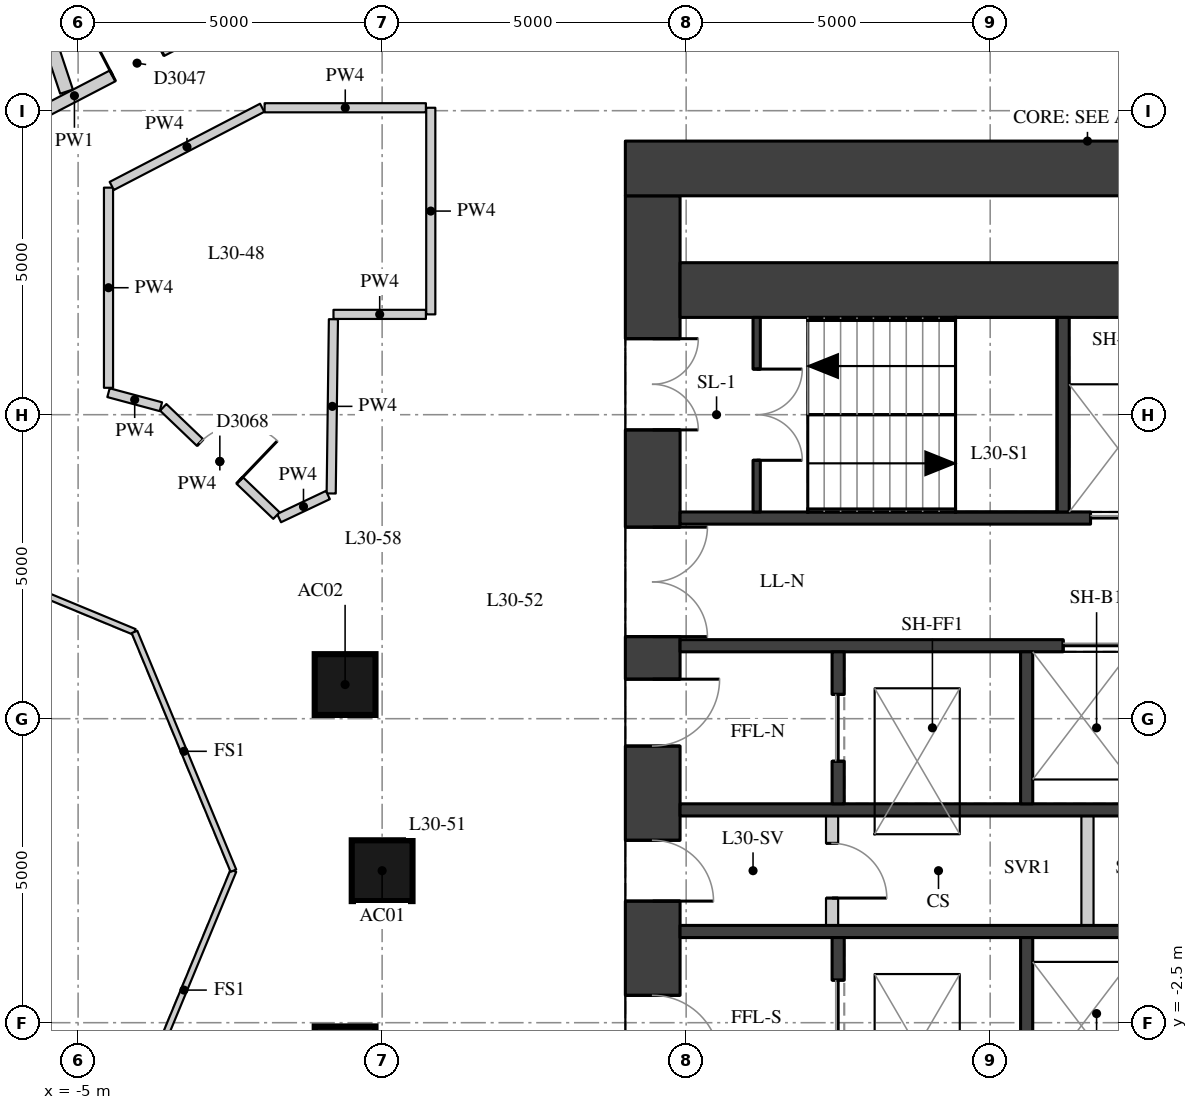
"""IFC4 building model, lengths in metres.
Left out: names, types, materials, properties, quantities, classifications, styles, units other than length and angle.
Written with IfcOpenShell. Run it as: python <this file> out.ifc"""

import sys

from ifc_helpers import new_model, si_unit, direction, frame, frame_2d, origin, origin_2d, place, context, subcontext, project, spatial, rectangle, extrude, element, fill, save


model = new_model("IFC4")
c1 = context("Model", 3, precision=1e-05, world=origin(), true_north=direction((0.0, 1.0)))
c2 = subcontext(c1, "Body", "Model", "MODEL_VIEW")
j1 = project(units=[si_unit("LENGTHUNIT", "METRE"), si_unit("PLANEANGLEUNIT", "RADIAN")], contexts=[c1])
p1 = place(None, origin())
s1 = spatial("IfcSite", under=j1, at=p1, CompositionType="ELEMENT")
p2 = place(p1, origin())
s2 = spatial("IfcBuilding", under=s1, at=p2, CompositionType="ELEMENT")
p3 = place(p2, frame((0.0, 0.0, 108.7)))
s3 = spatial("IfcBuildingStorey", under=s2, at=p3, CompositionType="ELEMENT", Elevation=108.7)
for number, where, z_axis, x_axis in (
    (1, (0.0, 0.0, 0.0), (0.0, 0.0, 1.0), (1.0, 0.0, 0.0)),
    (2, (-0.609, 3.062, 0.0), (0.0, 0.0, 1.0), (1.0, 0.0, 0.0)),
    (3, (-0.609, -3.062, 0.0), (0.0, 0.0, 1.0), (1.0, 0.0, 0.0)),
):
    element("IfcColumn", number, at=place(p3, frame(where, z_axis=z_axis, x_axis=x_axis)), inside=s3, PredefinedType="COLUMN", context=c2, shape_type="SweptSolid", body=[
        extrude(rectangle(XDim=1.0, YDim=1.0, at=origin_2d()), origin(), (0.0, 0.0, 1.0), 3.3),
    ])
p4 = place(p3, frame((4.45, -11.1, 0.0), z_axis=(0.0, 0.0, 1.0), x_axis=(0.0, 1.0, 0.0)))
e4 = element("IfcWall", 4, at=p4, inside=s3, PredefinedType="SHEAR", context=c2, shape_type="SweptSolid", body=[
    extrude(rectangle(XDim=22.2, YDim=0.9, at=frame_2d((11.1, 0.0))), origin(), (0.0, 0.0, 1.0), 3.02),
])
p5 = place(p4, frame((2.35, 0.0, 0.0)))
e5 = element("IfcOpeningElement", 5, at=p5, cuts=e4, PredefinedType="OPENING", context=c2, shape_type="SweptSolid", body=[
    extrude(rectangle(XDim=1.5, YDim=2.1, at=frame_2d((0.75, 1.05))), frame((0.0, 0.46, 0.0), z_axis=(0.0, -1.0, 0.0), x_axis=(1.0, 0.0, 0.0)), (0.0, 0.0, 1.0), 0.92),
])
p6 = place(p4, frame((5.45, 0.0, 0.0)))
e6 = element("IfcOpeningElement", 6, at=p6, cuts=e4, PredefinedType="OPENING", context=c2, shape_type="SweptSolid", body=[
    extrude(rectangle(XDim=1.8, YDim=2.1, at=frame_2d((0.9, 1.05))), frame((0.0, 0.46, 0.0), z_axis=(0.0, -1.0, 0.0), x_axis=(1.0, 0.0, 0.0)), (0.0, 0.0, 1.0), 0.92),
])
p7 = place(p4, frame((7.95, 0.0, 0.0)))
e7 = element("IfcOpeningElement", 7, at=p7, cuts=e4, PredefinedType="OPENING", context=c2, shape_type="SweptSolid", body=[
    extrude(rectangle(XDim=1.1, YDim=2.1, at=frame_2d((0.55, 1.05))), frame((0.0, 0.46, 0.0), z_axis=(0.0, -1.0, 0.0), x_axis=(1.0, 0.0, 0.0)), (0.0, 0.0, 1.0), 0.92),
])
p8 = place(p4, frame((10.6, 0.0, 0.0)))
e8 = element("IfcOpeningElement", 8, at=p8, cuts=e4, PredefinedType="OPENING", context=c2, shape_type="SweptSolid", body=[
    extrude(rectangle(XDim=1.0, YDim=2.1, at=frame_2d((0.5, 1.05))), frame((0.0, 0.46, 0.0), z_axis=(0.0, -1.0, 0.0), x_axis=(1.0, 0.0, 0.0)), (0.0, 0.0, 1.0), 0.92),
])
p9 = place(p4, frame((13.15, 0.0, 0.0)))
e9 = element("IfcOpeningElement", 9, at=p9, cuts=e4, PredefinedType="OPENING", context=c2, shape_type="SweptSolid", body=[
    extrude(rectangle(XDim=1.1, YDim=2.1, at=frame_2d((0.55, 1.05))), frame((0.0, 0.46, 0.0), z_axis=(0.0, -1.0, 0.0), x_axis=(1.0, 0.0, 0.0)), (0.0, 0.0, 1.0), 0.92),
])
p10 = place(p4, frame((14.95, 0.0, 0.0)))
e10 = element("IfcOpeningElement", 10, at=p10, cuts=e4, PredefinedType="OPENING", context=c2, shape_type="SweptSolid", body=[
    extrude(rectangle(XDim=1.8, YDim=2.1, at=frame_2d((0.9, 1.05))), frame((0.0, 0.46, 0.0), z_axis=(0.0, -1.0, 0.0), x_axis=(1.0, 0.0, 0.0)), (0.0, 0.0, 1.0), 0.92),
])
p11 = place(p4, frame((18.35, 0.0, 0.0)))
e11 = element("IfcOpeningElement", 11, at=p11, cuts=e4, PredefinedType="OPENING", context=c2, shape_type="SweptSolid", body=[
    extrude(rectangle(XDim=1.5, YDim=2.1, at=frame_2d((0.75, 1.05))), frame((0.0, 0.46, 0.0), z_axis=(0.0, -1.0, 0.0), x_axis=(1.0, 0.0, 0.0)), (0.0, 0.0, 1.0), 0.92),
])
p12 = place(p3, frame((4.0, 11.55, 0.0), z_axis=(0.0, 0.0, 1.0), x_axis=(1.0, 0.0, 0.0)))
e12 = element("IfcWall", 12, at=p12, inside=s3, PredefinedType="SHEAR", context=c2, shape_type="SweptSolid", body=[
    extrude(rectangle(XDim=15.2, YDim=0.9, at=frame_2d((7.6, 0.0))), origin(), (0.0, 0.0, 1.0), 3.02),
])
p13 = place(p3, frame((4.9, 9.55, 0.0), z_axis=(0.0, 0.0, 1.0), x_axis=(1.0, 0.0, 0.0)))
e13 = element("IfcWall", 13, at=p13, inside=s3, PredefinedType="SHEAR", context=c2, shape_type="SweptSolid", body=[
    extrude(rectangle(XDim=10.2, YDim=0.9, at=frame_2d((5.1, 0.0))), origin(), (0.0, 0.0, 1.0), 3.02),
])
p14 = place(p3, frame((4.9, 5.8, 0.0), z_axis=(0.0, 0.0, 1.0), x_axis=(1.0, 0.0, 0.0)))
e14 = element("IfcWall", 14, at=p14, inside=s3, PredefinedType="SHEAR", context=c2, shape_type="SweptSolid", body=[
    extrude(rectangle(XDim=10.2, YDim=0.2, at=frame_2d((5.1, 0.0))), origin(), (0.0, 0.0, 1.0), 3.02),
])
p15 = place(p14, frame((6.75, 0.0, 0.0)))
e15 = element("IfcOpeningElement", 15, at=p15, cuts=e14, PredefinedType="OPENING", context=c2, shape_type="SweptSolid", body=[
    extrude(rectangle(XDim=1.1, YDim=2.1, at=frame_2d((0.55, 1.05))), frame((0.0, 0.11, 0.0), z_axis=(0.0, -1.0, 0.0), x_axis=(1.0, 0.0, 0.0)), (0.0, 0.0, 1.0), 0.22),
])
p16 = place(p14, frame((8.75, 0.0, 0.0)))
e16 = element("IfcOpeningElement", 16, at=p16, cuts=e14, PredefinedType="OPENING", context=c2, shape_type="SweptSolid", body=[
    extrude(rectangle(XDim=1.1, YDim=2.1, at=frame_2d((0.55, 1.05))), frame((0.0, 0.11, 0.0), z_axis=(0.0, -1.0, 0.0), x_axis=(1.0, 0.0, 0.0)), (0.0, 0.0, 1.0), 0.22),
])
p17 = place(p3, frame((4.9, 3.7, 0.0), z_axis=(0.0, 0.0, 1.0), x_axis=(1.0, 0.0, 0.0)))
e17 = element("IfcWall", 17, at=p17, inside=s3, PredefinedType="SHEAR", context=c2, shape_type="SweptSolid", body=[
    extrude(rectangle(XDim=10.2, YDim=0.2, at=frame_2d((5.1, 0.0))), origin(), (0.0, 0.0, 1.0), 3.02),
])
p18 = place(p17, frame((6.3, 0.0, 0.0)))
e18 = element("IfcOpeningElement", 18, at=p18, cuts=e17, PredefinedType="OPENING", context=c2, shape_type="SweptSolid", body=[
    extrude(rectangle(XDim=1.1, YDim=2.1, at=frame_2d((0.55, 1.05))), frame((0.0, 0.11, 0.0), z_axis=(0.0, -1.0, 0.0), x_axis=(1.0, 0.0, 0.0)), (0.0, 0.0, 1.0), 0.22),
])
p19 = place(p17, frame((8.6, 0.0, 0.0)))
e19 = element("IfcOpeningElement", 19, at=p19, cuts=e17, PredefinedType="OPENING", context=c2, shape_type="SweptSolid", body=[
    extrude(rectangle(XDim=1.1, YDim=2.1, at=frame_2d((0.55, 1.05))), frame((0.0, 0.11, 0.0), z_axis=(0.0, -1.0, 0.0), x_axis=(1.0, 0.0, 0.0)), (0.0, 0.0, 1.0), 0.22),
])
for number, where, z_axis, x_axis in (
    (20, (4.9, 1.0, 0.0), (0.0, 0.0, 1.0), (1.0, 0.0, 0.0)),
    (21, (4.9, -1.0, 0.0), (0.0, 0.0, 1.0), (1.0, 0.0, 0.0)),
):
    element("IfcWall", number, at=place(p3, frame(where, z_axis=z_axis, x_axis=x_axis)), inside=s3, PredefinedType="SHEAR", context=c2, shape_type="SweptSolid", body=[
        extrude(rectangle(XDim=10.2, YDim=0.2, at=frame_2d((5.1, 0.0))), origin(), (0.0, 0.0, 1.0), 3.02),
    ])
p20 = place(p3, frame((11.2, 5.9, 0.0), z_axis=(0.0, 0.0, 1.0), x_axis=(0.0, 1.0, 0.0)))
e22 = element("IfcWall", 22, at=p20, inside=s3, PredefinedType="SHEAR", context=c2, shape_type="SweptSolid", body=[
    extrude(rectangle(XDim=3.2, YDim=0.2, at=frame_2d((1.6, 0.0))), origin(), (0.0, 0.0, 1.0), 3.02),
])
p21 = place(p3, frame((7.5, 1.1, 0.0), z_axis=(0.0, 0.0, 1.0), x_axis=(0.0, 1.0, 0.0)))
e23 = element("IfcWall", 23, at=p21, inside=s3, PredefinedType="SHEAR", context=c2, shape_type="SweptSolid", body=[
    extrude(rectangle(XDim=2.5, YDim=0.2, at=frame_2d((1.25, 0.0))), origin(), (0.0, 0.0, 1.0), 3.02),
])
p22 = place(p21, frame((0.7, 0.0, 0.0)))
e24 = element("IfcOpeningElement", 24, at=p22, cuts=e23, PredefinedType="OPENING", context=c2, shape_type="SweptSolid", body=[
    extrude(rectangle(XDim=1.1, YDim=2.1, at=frame_2d((0.55, 1.05))), frame((0.0, 0.11, 0.0), z_axis=(0.0, -1.0, 0.0), x_axis=(1.0, 0.0, 0.0)), (0.0, 0.0, 1.0), 0.22),
])
p23 = place(p3, frame((7.5, -3.6, 0.0), z_axis=(0.0, 0.0, 1.0), x_axis=(0.0, 1.0, 0.0)))
e25 = element("IfcWall", 25, at=p23, inside=s3, PredefinedType="SHEAR", context=c2, shape_type="SweptSolid", body=[
    extrude(rectangle(XDim=2.5, YDim=0.2, at=frame_2d((1.25, 0.0))), origin(), (0.0, 0.0, 1.0), 3.02),
])
p24 = place(p23, frame((0.7, 0.0, 0.0)))
e26 = element("IfcOpeningElement", 26, at=p24, cuts=e25, PredefinedType="OPENING", context=c2, shape_type="SweptSolid", body=[
    extrude(rectangle(XDim=1.1, YDim=2.1, at=frame_2d((0.55, 1.05))), frame((0.0, 0.11, 0.0), z_axis=(0.0, -1.0, 0.0), x_axis=(1.0, 0.0, 0.0)), (0.0, 0.0, 1.0), 0.22),
])
for number, where, z_axis, x_axis in (
    (27, (10.6, 1.1, 0.0), (0.0, 0.0, 1.0), (0.0, 1.0, 0.0)),
    (28, (10.6, -3.6, 0.0), (0.0, 0.0, 1.0), (0.0, 1.0, 0.0)),
):
    element("IfcWall", number, at=place(p3, frame(where, z_axis=z_axis, x_axis=x_axis)), inside=s3, PredefinedType="SHEAR", context=c2, shape_type="SweptSolid", body=[
        extrude(rectangle(XDim=2.5, YDim=0.2, at=frame_2d((1.25, 0.0))), origin(), (0.0, 0.0, 1.0), 3.02),
    ])
p25 = place(p3, frame((6.16, 5.9, 0.0), z_axis=(0.0, 0.0, 1.0), x_axis=(0.0, 1.0, 0.0)))
e29 = element("IfcWall", 29, at=p25, inside=s3, PredefinedType="SHEAR", context=c2, shape_type="SweptSolid", body=[
    extrude(rectangle(XDim=3.2, YDim=0.12, at=frame_2d((1.6, 0.0))), origin(), (0.0, 0.0, 1.0), 3.02),
])
p26 = place(p25, frame((0.85, 0.0, 0.0)))
e30 = element("IfcOpeningElement", 30, at=p26, cuts=e29, PredefinedType="OPENING", context=c2, shape_type="SweptSolid", body=[
    extrude(rectangle(XDim=1.5, YDim=2.1, at=frame_2d((0.75, 1.05))), frame((0.0, 0.07, 0.0), z_axis=(0.0, -1.0, 0.0), x_axis=(1.0, 0.0, 0.0)), (0.0, 0.0, 1.0), 0.14),
])
p27 = place(p3, frame((7.4, -0.9, 0.0), z_axis=(0.0, 0.0, 1.0), x_axis=(0.0, 1.0, 0.0)))
e31 = element("IfcWall", 31, at=p27, inside=s3, PredefinedType="PARTITIONING", context=c2, shape_type="SweptSolid", body=[
    extrude(rectangle(XDim=1.8, YDim=0.2, at=frame_2d((0.9, 0.0))), origin(), (0.0, 0.0, 1.0), 3.02),
])
p28 = place(p27, frame((0.45, 0.0, 0.0)))
e32 = element("IfcOpeningElement", 32, at=p28, cuts=e31, PredefinedType="OPENING", context=c2, shape_type="SweptSolid", body=[
    extrude(rectangle(XDim=0.9, YDim=2.1, at=frame_2d((0.45, 1.05))), frame((0.0, 0.11, 0.0), z_axis=(0.0, -1.0, 0.0), x_axis=(1.0, 0.0, 0.0)), (0.0, 0.0, 1.0), 0.22),
])
p29 = place(p3, frame((11.6, -0.9, 0.0), z_axis=(0.0, 0.0, 1.0), x_axis=(0.0, 1.0, 0.0)))
e33 = element("IfcWall", 33, at=p29, inside=s3, PredefinedType="PARTITIONING", context=c2, shape_type="SweptSolid", body=[
    extrude(rectangle(XDim=1.8, YDim=0.2, at=frame_2d((0.9, 0.0))), origin(), (0.0, 0.0, 1.0), 3.02),
])
p30 = place(p3, frame((-7.757, 11.344, 0.0), z_axis=(0.0, 0.0, 1.0), x_axis=(0.887263483993, 0.461262951008, 0.0)))
e34 = element("IfcWall", 34, at=p30, inside=s3, PredefinedType="PARTITIONING", context=c2, shape_type="SweptSolid", body=[
    extrude(rectangle(XDim=6.079, YDim=0.2, at=frame_2d((3.04, 0.0))), origin(), (0.0, 0.0, 1.0), 3.02),
])
p31 = place(p30, frame((3.75, 0.0, 0.0)))
e35 = element("IfcOpeningElement", 35, at=p31, cuts=e34, PredefinedType="OPENING", context=c2, shape_type="SweptSolid", body=[
    extrude(rectangle(XDim=0.9, YDim=2.1, at=frame_2d((0.45, 1.05))), frame((0.0, 0.11, 0.0), z_axis=(0.0, -1.0, 0.0), x_axis=(1.0, 0.0, 0.0)), (0.0, 0.0, 1.0), 0.22),
])
p32 = place(p3, frame((0.8, 12.548, 0.0), z_axis=(0.0, 0.0, 1.0), x_axis=(0.0, -1.0, 0.0)))
e36 = element("IfcWall", 36, at=p32, inside=s3, PredefinedType="PARTITIONING", context=c2, shape_type="SweptSolid", body=[
    extrude(rectangle(XDim=3.398, YDim=0.15, at=frame_2d((1.699, 0.0))), origin(), (0.0, 0.0, 1.0), 3.02),
])
p33 = place(p3, frame((0.72, 9.15, 0.0), z_axis=(0.0, 0.0, 1.0), x_axis=(-1.0, 0.0, 0.0)))
e37 = element("IfcWall", 37, at=p33, inside=s3, PredefinedType="PARTITIONING", context=c2, shape_type="SweptSolid", body=[
    extrude(rectangle(XDim=1.52, YDim=0.15, at=frame_2d((0.76, 0.0))), origin(), (0.0, 0.0, 1.0), 3.02),
])
p34 = place(p3, frame((-0.801, 9.07, 0.0), z_axis=(0.0, 0.0, 1.0), x_axis=(-0.012779053564, -0.999918344561, 0.0)))
e38 = element("IfcWall", 38, at=p34, inside=s3, PredefinedType="PARTITIONING", context=c2, shape_type="SweptSolid", body=[
    extrude(rectangle(XDim=2.866, YDim=0.15, at=frame_2d((1.433, 0.0))), origin(), (0.0, 0.0, 1.0), 3.02),
])
p35 = place(p3, frame((-0.892, 6.179, 0.0), z_axis=(0.0, 0.0, 1.0), x_axis=(-0.903944794982, -0.427649164181, 0.0)))
e39 = element("IfcWall", 39, at=p35, inside=s3, PredefinedType="PARTITIONING", context=c2, shape_type="SweptSolid", body=[
    extrude(rectangle(XDim=0.888, YDim=0.15, at=frame_2d((0.444, 0.0))), origin(), (0.0, 0.0, 1.0), 3.02),
])
p36 = place(p3, frame((-1.738, 5.841, 0.0), z_axis=(0.0, 0.0, 1.0), x_axis=(-0.722802374111, 0.691054793761, 0.0)))
e40 = element("IfcWall", 40, at=p36, inside=s3, PredefinedType="PARTITIONING", context=c2, shape_type="SweptSolid", body=[
    extrude(rectangle(XDim=2.576, YDim=0.15, at=frame_2d((1.288, 0.0))), origin(), (0.0, 0.0, 1.0), 3.02),
])
p37 = place(p36, frame((0.838, 0.0, 0.0)))
e41 = element("IfcOpeningElement", 41, at=p37, cuts=e40, PredefinedType="OPENING", context=c2, shape_type="SweptSolid", body=[
    extrude(rectangle(XDim=0.9, YDim=2.1, at=frame_2d((0.45, 1.05))), frame((0.0, 0.085, 0.0), z_axis=(0.0, -1.0, 0.0), x_axis=(1.0, 0.0, 0.0)), (0.0, 0.0, 1.0), 0.17),
])
p38 = place(p3, frame((-3.639, 7.631, 0.0), z_axis=(0.0, 0.0, 1.0), x_axis=(-0.965879594242, 0.258991523853, 0.0)))
e42 = element("IfcWall", 42, at=p38, inside=s3, PredefinedType="PARTITIONING", context=c2, shape_type="SweptSolid", body=[
    extrude(rectangle(XDim=0.892, YDim=0.15, at=frame_2d((0.446, 0.0))), origin(), (0.0, 0.0, 1.0), 3.02),
])
p39 = place(p3, frame((-4.5, 7.942, 0.0), z_axis=(0.0, 0.0, 1.0), x_axis=(0.0, 1.0, 0.0)))
e43 = element("IfcWall", 43, at=p39, inside=s3, PredefinedType="PARTITIONING", context=c2, shape_type="SweptSolid", body=[
    extrude(rectangle(XDim=3.292, YDim=0.15, at=frame_2d((1.646, 0.0))), origin(), (0.0, 0.0, 1.0), 3.02),
])
p40 = place(p3, frame((-4.447, 11.262, 0.0), z_axis=(0.0, 0.0, 1.0), x_axis=(0.887294207503, 0.461203847915, 0.0)))
e44 = element("IfcWall", 44, at=p40, inside=s3, PredefinedType="PARTITIONING", context=c2, shape_type="SweptSolid", body=[
    extrude(rectangle(XDim=2.788, YDim=0.15, at=frame_2d((1.394, 0.0))), origin(), (0.0, 0.0, 1.0), 3.02),
])
p41 = place(p3, frame((-1.933, 12.548, 0.0), z_axis=(0.0, 0.0, 1.0), x_axis=(1.0, 0.0, 0.0)))
e45 = element("IfcWall", 45, at=p41, inside=s3, PredefinedType="PARTITIONING", context=c2, shape_type="SweptSolid", body=[
    extrude(rectangle(XDim=2.653, YDim=0.15, at=frame_2d((1.326, 0.0))), origin(), (0.0, 0.0, 1.0), 3.02),
])
p42 = place(p3, frame((-7.874, 20.912, 0.0), z_axis=(0.0, 0.0, 1.0), x_axis=(0.314561749761, -0.949237012335, 0.0)))
e46 = element("IfcWall", 46, at=p42, inside=s3, PredefinedType="PARTITIONING", context=c2, shape_type="SweptSolid", body=[
    extrude(rectangle(XDim=8.531, YDim=0.22, at=frame_2d((4.266, 0.0))), origin(), (0.0, 0.0, 1.0), 3.02),
])
for number, where, z_axis, x_axis in (
    (47, (-2.446, 0.0, 0.0), (0.0, 0.0, 1.0), (-0.383, -0.924, 0.0)),
    (48, (-8.0, 5.554, 0.0), (0.0, 0.0, 1.0), (0.924, -0.383, 0.0)),
    (49, (-4.073, 3.927, 0.0), (0.0, 0.0, 1.0), (0.383, -0.924, 0.0)),
):
    element("IfcWall", number, at=place(p3, frame(where, z_axis=z_axis, x_axis=x_axis)), inside=s3, PredefinedType="PARTITIONING", context=c2, shape_type="SweptSolid", body=[
        extrude(rectangle(XDim=4.251, YDim=0.1, at=frame_2d((2.125, 0.0))), origin(), (0.0, 0.0, 1.0), 3.02),
    ])
p43 = place(p7, origin())
e50 = element("IfcDoor", 50, at=p43, inside=s3, OperationType="SINGLE_SWING_RIGHT", PredefinedType="DOOR", context=c2, shape_type="SweptSolid", body=[
    extrude(rectangle(XDim=1.1, YDim=2.1, at=frame_2d((0.55, 1.05))), frame((0.0, 0.025, 0.0), z_axis=(0.0, -1.0, 0.0), x_axis=(1.0, 0.0, 0.0)), (0.0, 0.0, 1.0), 0.05),
])
fill(e7, e50)
p44 = place(p8, origin())
e51 = element("IfcDoor", 51, at=p44, inside=s3, OperationType="SINGLE_SWING_RIGHT", PredefinedType="DOOR", context=c2, shape_type="SweptSolid", body=[
    extrude(rectangle(XDim=1.0, YDim=2.1, at=frame_2d((0.5, 1.05))), frame((0.0, 0.025, 0.0), z_axis=(0.0, -1.0, 0.0), x_axis=(1.0, 0.0, 0.0)), (0.0, 0.0, 1.0), 0.05),
])
fill(e8, e51)
p45 = place(p9, origin())
e52 = element("IfcDoor", 52, at=p45, inside=s3, OperationType="SINGLE_SWING_LEFT", PredefinedType="DOOR", context=c2, shape_type="SweptSolid", body=[
    extrude(rectangle(XDim=1.1, YDim=2.1, at=frame_2d((0.55, 1.05))), frame((0.0, 0.025, 0.0), z_axis=(0.0, -1.0, 0.0), x_axis=(1.0, 0.0, 0.0)), (0.0, 0.0, 1.0), 0.05),
])
fill(e9, e52)
p46 = place(p10, origin())
e53 = element("IfcDoor", 53, at=p46, inside=s3, OperationType="DOUBLE_DOOR_SINGLE_SWING", PredefinedType="DOOR", context=c2, shape_type="SweptSolid", body=[
    extrude(rectangle(XDim=1.8, YDim=2.1, at=frame_2d((0.9, 1.05))), frame((0.0, 0.025, 0.0), z_axis=(0.0, -1.0, 0.0), x_axis=(1.0, 0.0, 0.0)), (0.0, 0.0, 1.0), 0.05),
])
fill(e10, e53)
p47 = place(p11, origin())
e54 = element("IfcDoor", 54, at=p47, inside=s3, OperationType="DOUBLE_DOOR_SINGLE_SWING", PredefinedType="DOOR", context=c2, shape_type="SweptSolid", body=[
    extrude(rectangle(XDim=1.5, YDim=2.1, at=frame_2d((0.75, 1.05))), frame((0.0, 0.025, 0.0), z_axis=(0.0, -1.0, 0.0), x_axis=(1.0, 0.0, 0.0)), (0.0, 0.0, 1.0), 0.05),
])
fill(e11, e54)
p48 = place(p26, origin())
e55 = element("IfcDoor", 55, at=p48, inside=s3, OperationType="DOUBLE_DOOR_SINGLE_SWING", PredefinedType="DOOR", context=c2, shape_type="SweptSolid", body=[
    extrude(rectangle(XDim=1.5, YDim=2.1, at=frame_2d((0.75, 1.05))), frame((0.0, 0.025, 0.0), z_axis=(0.0, -1.0, 0.0), x_axis=(1.0, 0.0, 0.0)), (0.0, 0.0, 1.0), 0.05),
])
fill(e30, e55)
p49 = place(p15, origin())
e56 = element("IfcDoor", 56, at=p49, inside=s3, OperationType="DOUBLE_DOOR_SLIDING", PredefinedType="DOOR", context=c2, shape_type="SweptSolid", body=[
    extrude(rectangle(XDim=1.1, YDim=2.1, at=frame_2d((0.55, 1.05))), frame((0.0, 0.025, 0.0), z_axis=(0.0, -1.0, 0.0), x_axis=(1.0, 0.0, 0.0)), (0.0, 0.0, 1.0), 0.05),
])
fill(e15, e56)
p50 = place(p18, origin())
e57 = element("IfcDoor", 57, at=p50, inside=s3, OperationType="DOUBLE_DOOR_SLIDING", PredefinedType="DOOR", context=c2, shape_type="SweptSolid", body=[
    extrude(rectangle(XDim=1.1, YDim=2.1, at=frame_2d((0.55, 1.05))), frame((0.0, 0.025, 0.0), z_axis=(0.0, -1.0, 0.0), x_axis=(1.0, 0.0, 0.0)), (0.0, 0.0, 1.0), 0.05),
])
fill(e18, e57)
p51 = place(p22, origin())
e58 = element("IfcDoor", 58, at=p51, inside=s3, OperationType="DOUBLE_DOOR_SLIDING", PredefinedType="DOOR", context=c2, shape_type="SweptSolid", body=[
    extrude(rectangle(XDim=1.1, YDim=2.1, at=frame_2d((0.55, 1.05))), frame((0.0, 0.025, 0.0), z_axis=(0.0, -1.0, 0.0), x_axis=(1.0, 0.0, 0.0)), (0.0, 0.0, 1.0), 0.05),
])
fill(e24, e58)
p52 = place(p24, origin())
e59 = element("IfcDoor", 59, at=p52, inside=s3, OperationType="DOUBLE_DOOR_SLIDING", PredefinedType="DOOR", context=c2, shape_type="SweptSolid", body=[
    extrude(rectangle(XDim=1.1, YDim=2.1, at=frame_2d((0.55, 1.05))), frame((0.0, 0.025, 0.0), z_axis=(0.0, -1.0, 0.0), x_axis=(1.0, 0.0, 0.0)), (0.0, 0.0, 1.0), 0.05),
])
fill(e26, e59)
p53 = place(p28, origin())
e60 = element("IfcDoor", 60, at=p53, inside=s3, OperationType="SINGLE_SWING_RIGHT", PredefinedType="DOOR", context=c2, shape_type="SweptSolid", body=[
    extrude(rectangle(XDim=0.9, YDim=2.1, at=frame_2d((0.45, 1.05))), frame((0.0, 0.025, 0.0), z_axis=(0.0, -1.0, 0.0), x_axis=(1.0, 0.0, 0.0)), (0.0, 0.0, 1.0), 0.05),
])
fill(e32, e60)
p54 = place(p31, origin())
e61 = element("IfcDoor", 61, at=p54, inside=s3, OperationType="SINGLE_SWING_LEFT", PredefinedType="DOOR", context=c2, shape_type="SweptSolid", body=[
    extrude(rectangle(XDim=0.9, YDim=2.1, at=frame_2d((0.45, 1.05))), frame((0.0, 0.025, 0.0), z_axis=(0.0, -1.0, 0.0), x_axis=(1.0, 0.0, 0.0)), (0.0, 0.0, 1.0), 0.05),
])
fill(e35, e61)
p55 = place(p37, origin())
e62 = element("IfcDoor", 62, at=p55, inside=s3, OperationType="SINGLE_SWING_RIGHT", PredefinedType="DOOR", context=c2, shape_type="SweptSolid", body=[
    extrude(rectangle(XDim=0.9, YDim=2.1, at=frame_2d((0.45, 1.05))), frame((0.0, 0.025, 0.0), z_axis=(0.0, -1.0, 0.0), x_axis=(1.0, 0.0, 0.0)), (0.0, 0.0, 1.0), 0.05),
])
fill(e41, e62)
save(model, sys.argv[1])
